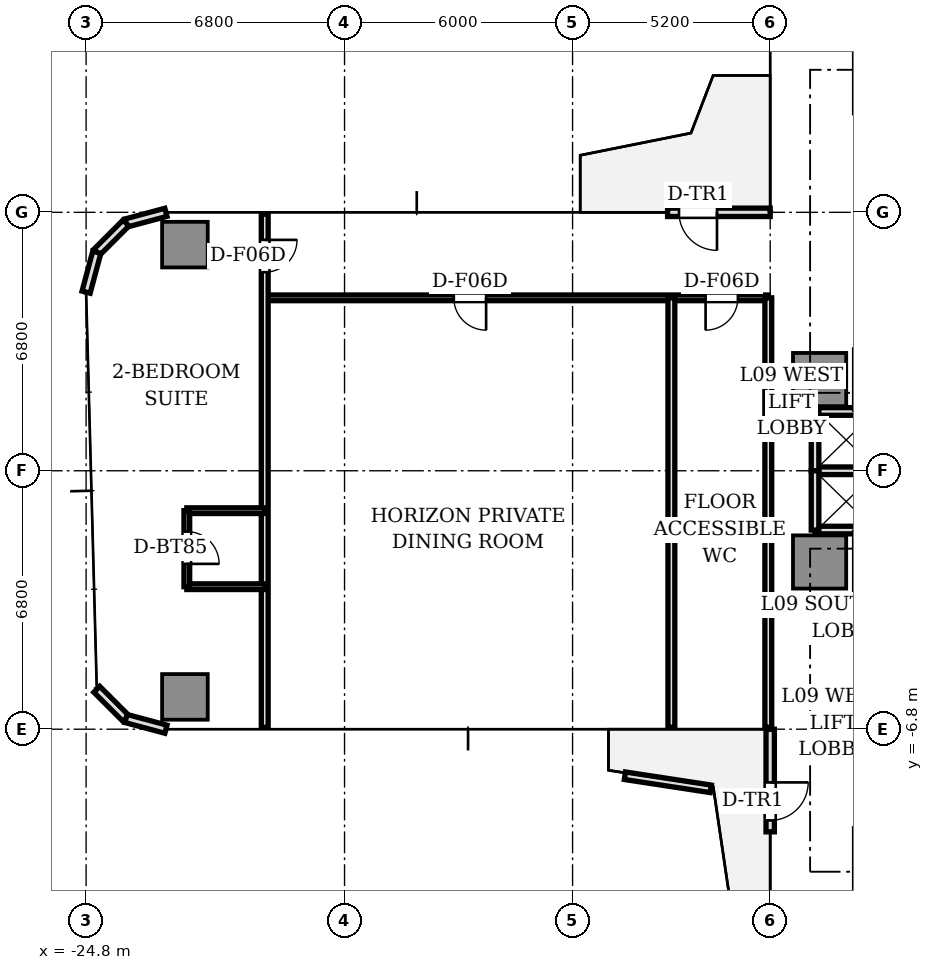
"""IFC4 building model, lengths in metres.
Left out: names, types, materials, properties, quantities, classifications, styles, units other than length and angle.
Written with IfcOpenShell. Run it as: python <this file> out.ifc"""

import sys

from ifc_helpers import new_model, si_unit, direction, frame, frame_2d, origin, origin_2d, place, context, subcontext, project, spatial, rectangle, extrude, source, transform, mapped, element, fill, save


model = new_model("IFC4")
c1 = context("Model", 3, precision=1e-05, world=origin(), true_north=direction((0.0, 1.0)))
c2 = subcontext(c1, "Body", "Model", "MODEL_VIEW")
j1 = project(units=[si_unit("LENGTHUNIT", "METRE"), si_unit("PLANEANGLEUNIT", "RADIAN")], contexts=[c1])
p1 = place(None, origin())
s1 = spatial("IfcSite", under=j1, at=p1, CompositionType="ELEMENT")
p2 = place(p1, origin())
s2 = spatial("IfcBuilding", under=s1, at=p2, CompositionType="ELEMENT")
p3 = place(p2, frame((0.0, 0.0, 36.5)))
s3 = spatial("IfcBuildingStorey", under=s2, at=p3, CompositionType="ELEMENT", Elevation=36.5)
m1 = source(origin(), c2, "Body", "SweptSolid", [
    extrude(rectangle(XDim=1.4, YDim=1.4, at=origin_2d()), origin(), (0.0, 0.0, 1.0), 3.11),
])
for number, where, z_axis, x_axis in (
    (1, (-5.5, 2.4, 0.0), (0.0, 0.0, 1.0), (1.0, 0.0, 0.0)),
    (2, (-5.5, -2.4, 0.0), (0.0, 0.0, 1.0), (1.0, 0.0, 0.0)),
):
    element("IfcColumn", number, at=place(p3, frame(where, z_axis=z_axis, x_axis=x_axis)), inside=s3, PredefinedType="COLUMN", context=c2, shape_type="MappedRepresentation", body=[
        mapped(m1, transform((0.0, 0.0, 0.0), scale=1.0)),
    ])
m2 = source(origin(), c2, "Body", "SweptSolid", [
    extrude(rectangle(XDim=1.2, YDim=1.2, at=origin_2d()), origin(), (0.0, 0.0, 1.0), 3.11),
])
for number, where, z_axis, x_axis in (
    (3, (-22.2, 5.95, 0.0), (0.0, 0.0, 1.0), (1.0, 0.0, 0.0)),
    (4, (-22.2, -5.95, 0.0), (0.0, 0.0, 1.0), (1.0, 0.0, 0.0)),
):
    element("IfcColumn", number, at=place(p3, frame(where, z_axis=z_axis, x_axis=x_axis)), inside=s3, PredefinedType="COLUMN", context=c2, shape_type="MappedRepresentation", body=[
        mapped(m2, transform((0.0, 0.0, 0.0), scale=1.0)),
    ])
p4 = place(p3, frame((-6.8, 6.8, 0.0), z_axis=(0.0, 0.0, 1.0), x_axis=(-1.0, 0.0, 0.0)))
e5 = element("IfcWall", 5, at=p4, inside=s3, PredefinedType="STANDARD", context=c2, shape_type="SweptSolid", body=[
    extrude(rectangle(XDim=2.7, YDim=0.22, at=frame_2d((1.35, 0.0))), origin(), (0.0, 0.0, 1.0), 3.11),
])
p5 = place(p4, frame((1.4, 0.0, 0.0)))
e6 = element("IfcOpeningElement", 6, at=p5, cuts=e5, PredefinedType="OPENING", context=c2, shape_type="SweptSolid", body=[
    extrude(rectangle(XDim=1.0, YDim=2.2, at=frame_2d((0.5, 1.1))), frame((0.0, 0.12, 0.0), z_axis=(0.0, -1.0, 0.0), x_axis=(1.0, 0.0, 0.0)), (0.0, 0.0, 1.0), 0.24),
])
for number, where, z_axis, x_axis in (
    (7, (-22.7, 6.8, 0.0), (0.0, 0.0, 1.0), (-0.966, -0.259, 0.0)),
    (8, (-23.75, 6.519, 0.0), (0.0, 0.0, 1.0), (-0.707, -0.707, 0.0)),
    (9, (-24.519, 5.75, 0.0), (0.0, 0.0, 1.0), (-0.259, -0.966, 0.0)),
    (10, (-24.519, -5.75, 0.0), (0.0, 0.0, 1.0), (0.707, -0.707, 0.0)),
    (11, (-23.75, -6.519, 0.0), (0.0, 0.0, 1.0), (0.966, -0.259, 0.0)),
):
    element("IfcWall", number, at=place(p3, frame(where, z_axis=z_axis, x_axis=x_axis)), inside=s3, PredefinedType="STANDARD", context=c2, shape_type="SweptSolid", body=[
        extrude(rectangle(XDim=1.087, YDim=0.22, at=frame_2d((0.543, 0.0))), origin(), (0.0, 0.0, 1.0), 3.11),
    ])
p6 = place(p3, frame((-6.8, -6.8, 0.0), z_axis=(0.0, 0.0, 1.0), x_axis=(0.0, -1.0, 0.0)))
e12 = element("IfcWall", 12, at=p6, inside=s3, PredefinedType="STANDARD", context=c2, shape_type="SweptSolid", body=[
    extrude(rectangle(XDim=2.7, YDim=0.22, at=frame_2d((1.35, 0.0))), origin(), (0.0, 0.0, 1.0), 3.11),
])
p7 = place(p6, frame((1.4, 0.0, 0.0)))
e13 = element("IfcOpeningElement", 13, at=p7, cuts=e12, PredefinedType="OPENING", context=c2, shape_type="SweptSolid", body=[
    extrude(rectangle(XDim=1.0, YDim=2.2, at=frame_2d((0.5, 1.1))), frame((0.0, 0.12, 0.0), z_axis=(0.0, -1.0, 0.0), x_axis=(1.0, 0.0, 0.0)), (0.0, 0.0, 1.0), 0.24),
])
p8 = place(p3, frame((-10.623, -8.024, 0.0), z_axis=(0.0, 0.0, 1.0), x_axis=(0.988574583679, -0.150732519729, 0.0)))
e14 = element("IfcWall", 14, at=p8, inside=s3, PredefinedType="PARAPET", context=c2, shape_type="SweptSolid", body=[
    extrude(rectangle(XDim=2.285, YDim=0.2, at=frame_2d((1.143, 0.0))), origin(), (0.0, 0.0, 1.0), 0.65),
])
for number, where, z_axis, x_axis in (
    (15, (-5.62, 1.56, 0.0), (0.0, 0.0, 1.0), (1.0, 0.0, 0.0)),
    (16, (-5.62, -1.56, 0.0), (0.0, 0.0, 1.0), (1.0, 0.0, 0.0)),
    (17, (-5.62, 0.0, 0.0), (0.0, 0.0, 1.0), (1.0, 0.0, 0.0)),
):
    element("IfcWall", number, at=place(p3, frame(where, z_axis=z_axis, x_axis=x_axis)), inside=s3, PredefinedType="SOLIDWALL", context=c2, shape_type="SweptSolid", body=[
        extrude(rectangle(XDim=1.64, YDim=0.2, at=frame_2d((0.82, 0.0))), origin(), (0.0, 0.0, 1.0), 2.66),
    ])
for number, where, z_axis, x_axis in (
    (18, (-5.62, 0.0, 0.0), (0.0, 0.0, 1.0), (0.0, 1.0, 0.0)),
    (19, (-5.62, -1.56, 0.0), (0.0, 0.0, 1.0), (0.0, 1.0, 0.0)),
):
    element("IfcWall", number, at=place(p3, frame(where, z_axis=z_axis, x_axis=x_axis)), inside=s3, PredefinedType="SOLIDWALL", context=c2, shape_type="SweptSolid", body=[
        extrude(rectangle(XDim=1.56, YDim=0.2, at=frame_2d((0.78, 0.0))), origin(), (0.0, 0.0, 1.0), 2.66),
    ])
p9 = place(p3, frame((-6.85, 4.55, 0.0), z_axis=(0.0, 0.0, 1.0), x_axis=(-1.0, 0.0, 0.0)))
e20 = element("IfcWall", 20, at=p9, inside=s3, PredefinedType="PARTITIONING", context=c2, shape_type="SweptSolid", body=[
    extrude(rectangle(XDim=13.25, YDim=0.15, at=frame_2d((6.625, 0.0))), origin(), (0.0, 0.0, 1.0), 2.63),
])
p10 = place(p9, frame((0.8, 0.0, 0.0)))
e21 = element("IfcOpeningElement", 21, at=p10, cuts=e20, PredefinedType="OPENING", context=c2, shape_type="SweptSolid", body=[
    extrude(rectangle(XDim=0.85, YDim=2.1, at=frame_2d((0.425, 1.05))), frame((0.0, 0.085, 0.0), z_axis=(0.0, -1.0, 0.0), x_axis=(1.0, 0.0, 0.0)), (0.0, 0.0, 1.0), 0.17),
])
p11 = place(p9, frame((7.425, 0.0, 0.0)))
e22 = element("IfcOpeningElement", 22, at=p11, cuts=e20, PredefinedType="OPENING", context=c2, shape_type="SweptSolid", body=[
    extrude(rectangle(XDim=0.85, YDim=2.1, at=frame_2d((0.425, 1.05))), frame((0.0, 0.085, 0.0), z_axis=(0.0, -1.0, 0.0), x_axis=(1.0, 0.0, 0.0)), (0.0, 0.0, 1.0), 0.17),
])
for number, where, z_axis, x_axis in (
    (23, (-6.85, 4.55, 0.0), (0.0, 0.0, 1.0), (0.0, -1.0, 0.0)),
    (24, (-9.4, 4.55, 0.0), (0.0, 0.0, 1.0), (0.0, -1.0, 0.0)),
):
    element("IfcWall", number, at=place(p3, frame(where, z_axis=z_axis, x_axis=x_axis)), inside=s3, PredefinedType="PARTITIONING", context=c2, shape_type="SweptSolid", body=[
        extrude(rectangle(XDim=11.3, YDim=0.18, at=frame_2d((5.65, 0.0))), origin(), (0.0, 0.0, 1.0), 2.66),
    ])
p12 = place(p3, frame((-20.1, 6.75, 0.0), z_axis=(0.0, 0.0, 1.0), x_axis=(0.0, -1.0, 0.0)))
e25 = element("IfcWall", 25, at=p12, inside=s3, PredefinedType="PARTITIONING", context=c2, shape_type="SweptSolid", body=[
    extrude(rectangle(XDim=13.5, YDim=0.18, at=frame_2d((6.75, 0.0))), origin(), (0.0, 0.0, 1.0), 2.66),
])
p13 = place(p12, frame((0.675, 0.0, 0.0)))
e26 = element("IfcOpeningElement", 26, at=p13, cuts=e25, PredefinedType="OPENING", context=c2, shape_type="SweptSolid", body=[
    extrude(rectangle(XDim=0.85, YDim=2.1, at=frame_2d((0.425, 1.05))), frame((0.0, 0.1, 0.0), z_axis=(0.0, -1.0, 0.0), x_axis=(1.0, 0.0, 0.0)), (0.0, 0.0, 1.0), 0.2),
])
p14 = place(p3, frame((-20.1, -3.05, 0.0), z_axis=(0.0, 0.0, 1.0), x_axis=(-1.0, 0.0, 0.0)))
e27 = element("IfcWall", 27, at=p14, inside=s3, PredefinedType="PARTITIONING", context=c2, shape_type="SweptSolid", body=[
    extrude(rectangle(XDim=2.05, YDim=0.15, at=frame_2d((1.025, 0.0))), origin(), (0.0, 0.0, 1.0), 2.63),
])
p15 = place(p3, frame((-20.1, -1.05, 0.0), z_axis=(0.0, 0.0, 1.0), x_axis=(-1.0, 0.0, 0.0)))
e28 = element("IfcWall", 28, at=p15, inside=s3, PredefinedType="PARTITIONING", context=c2, shape_type="SweptSolid", body=[
    extrude(rectangle(XDim=2.05, YDim=0.15, at=frame_2d((1.025, 0.0))), origin(), (0.0, 0.0, 1.0), 2.66),
])
p16 = place(p3, frame((-22.15, -1.05, 0.0), z_axis=(0.0, 0.0, 1.0), x_axis=(0.0, -1.0, 0.0)))
e29 = element("IfcWall", 29, at=p16, inside=s3, PredefinedType="PARTITIONING", context=c2, shape_type="SweptSolid", body=[
    extrude(rectangle(XDim=2.0, YDim=0.15, at=frame_2d((1.0, 0.0))), origin(), (0.0, 0.0, 1.0), 2.58),
])
p17 = place(p16, frame((0.55, 0.0, 0.0)))
e30 = element("IfcOpeningElement", 30, at=p17, cuts=e29, PredefinedType="OPENING", context=c2, shape_type="SweptSolid", body=[
    extrude(rectangle(XDim=0.85, YDim=2.1, at=frame_2d((0.425, 1.05))), frame((0.0, 0.085, 0.0), z_axis=(0.0, -1.0, 0.0), x_axis=(1.0, 0.0, 0.0)), (0.0, 0.0, 1.0), 0.17),
])
m3 = source(origin(), c2, "Body", "SweptSolid", [
    extrude(rectangle(XDim=1.0, YDim=0.05, at=origin_2d()), origin(), (0.0, 0.0, 1.0), 2.2),
])
p18 = place(p5, frame((0.5, 0.0, 0.0)))
e31 = element("IfcDoor", 31, at=p18, inside=s3, OperationType="SINGLE_SWING_LEFT", PredefinedType="DOOR", context=c2, shape_type="MappedRepresentation", body=[
    mapped(m3, transform((0.0, 0.0, 0.0), scale=1.0)),
])
fill(e6, e31)
p19 = place(p7, frame((0.5, 0.0, 0.0)))
e32 = element("IfcDoor", 32, at=p19, inside=s3, OperationType="SINGLE_SWING_LEFT", PredefinedType="DOOR", context=c2, shape_type="MappedRepresentation", body=[
    mapped(m3, transform((0.0, 0.0, 0.0), scale=1.0)),
])
fill(e13, e32)
m4 = source(origin(), c2, "Body", "SweptSolid", [
    extrude(rectangle(XDim=0.85, YDim=0.05, at=origin_2d()), origin(), (0.0, 0.0, 1.0), 2.1),
])
p20 = place(p10, frame((0.425, 0.0, 0.0)))
e33 = element("IfcDoor", 33, at=p20, inside=s3, OperationType="SINGLE_SWING_RIGHT", PredefinedType="DOOR", context=c2, shape_type="MappedRepresentation", body=[
    mapped(m4, transform((0.0, 0.0, 0.0), scale=1.0)),
])
fill(e21, e33)
p21 = place(p11, frame((0.425, 0.0, 0.0)))
e34 = element("IfcDoor", 34, at=p21, inside=s3, OperationType="SINGLE_SWING_LEFT", PredefinedType="DOOR", context=c2, shape_type="MappedRepresentation", body=[
    mapped(m4, transform((0.0, 0.0, 0.0), scale=1.0)),
])
fill(e22, e34)
p22 = place(p17, frame((0.425, 0.0, 0.0)))
e35 = element("IfcDoor", 35, at=p22, inside=s3, OperationType="SINGLE_SWING_RIGHT", PredefinedType="DOOR", context=c2, shape_type="MappedRepresentation", body=[
    mapped(m4, transform((0.0, 0.0, 0.0), scale=1.0)),
])
fill(e30, e35)
p23 = place(p13, frame((0.425, 0.0, 0.0)))
e36 = element("IfcDoor", 36, at=p23, inside=s3, OperationType="SINGLE_SWING_LEFT", PredefinedType="DOOR", context=c2, shape_type="MappedRepresentation", body=[
    mapped(m4, transform((0.0, 0.0, 0.0), scale=1.0)),
])
fill(e26, e36)
save(model, sys.argv[1])
